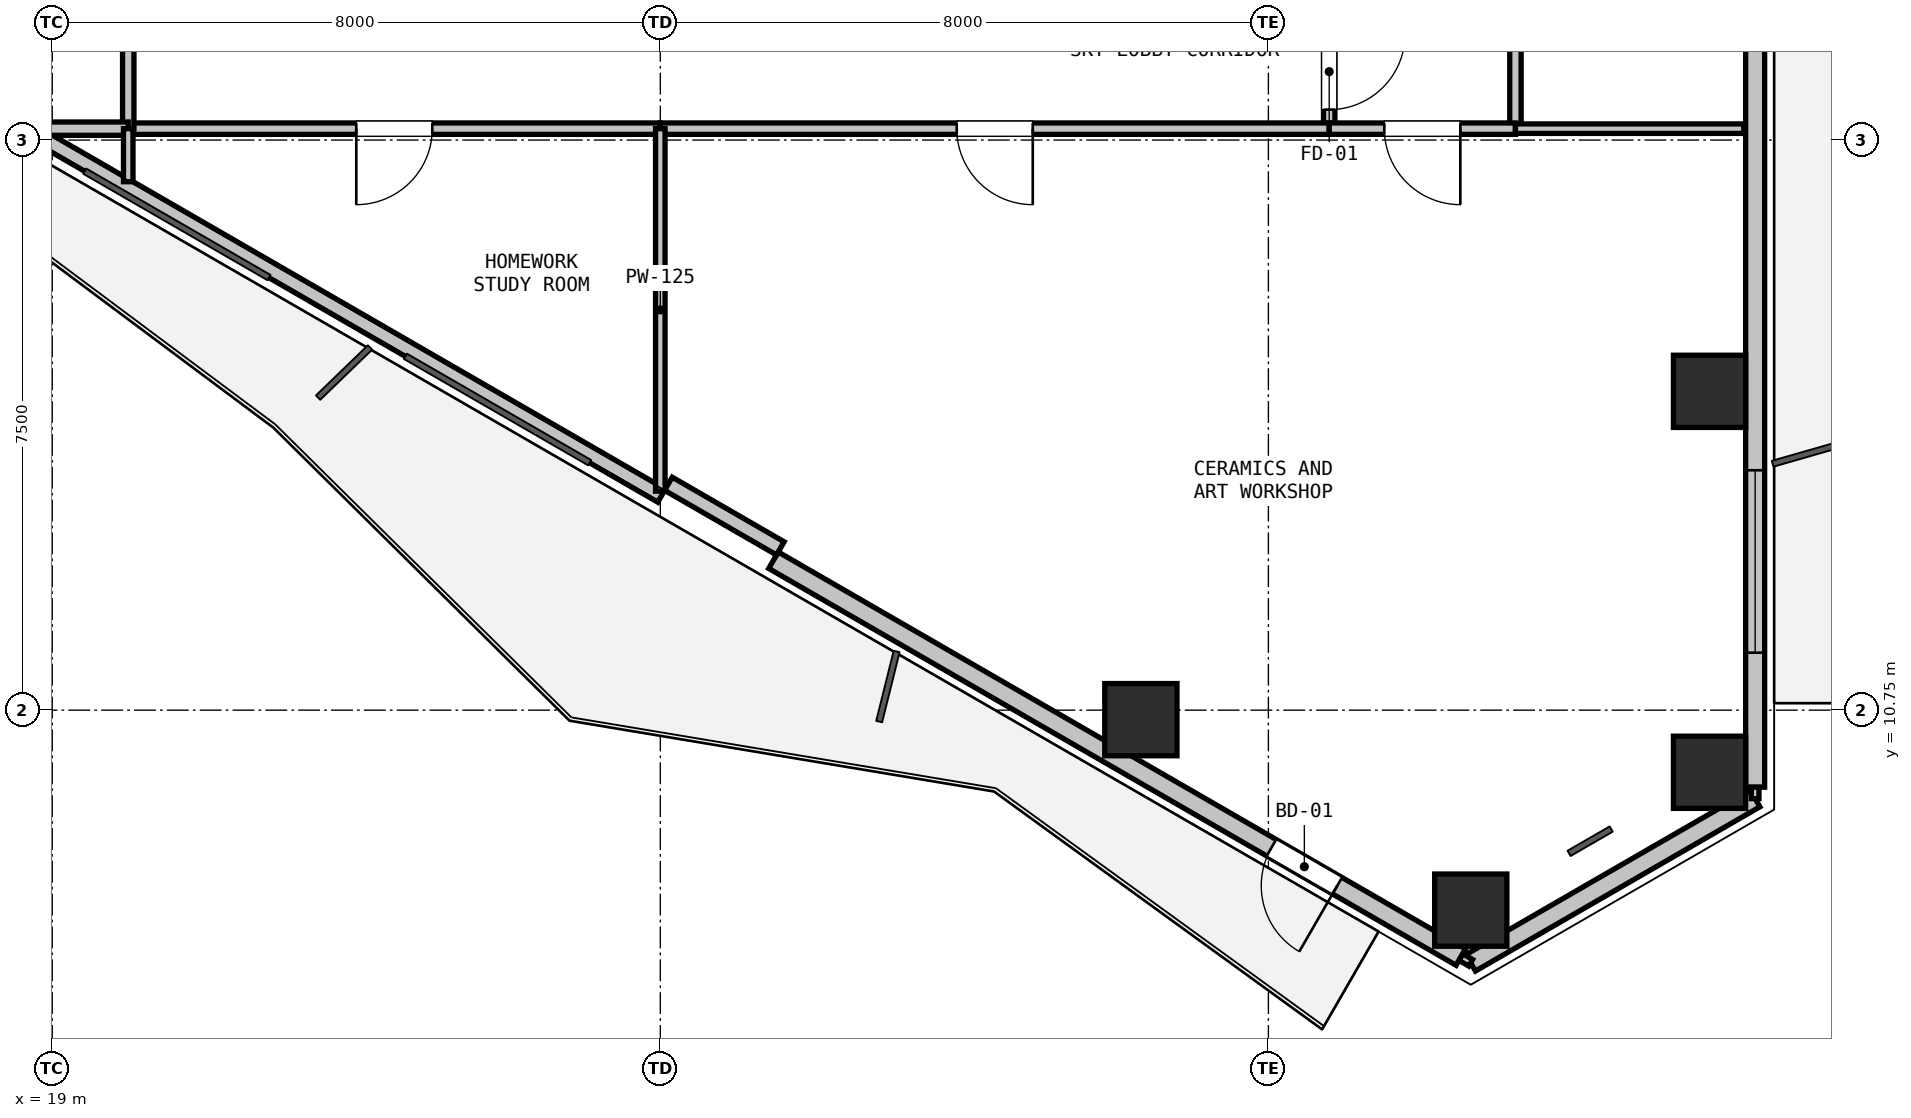
"""IFC4 building model, lengths in metres.
Left out: names, types, materials, properties, quantities, classifications, styles, units other than length and angle.
Written with IfcOpenShell. Run it as: python <this file> out.ifc"""

import sys

from ifc_helpers import new_model, si_unit, direction, frame, frame_2d, origin, origin_2d, place, context, subcontext, project, spatial, rectangle, hollow_rectangle, extrude, element, fill, save


model = new_model("IFC4")
c1 = context("Model", 3, precision=1e-05, world=origin(), true_north=direction((0.0, 1.0)))
c2 = subcontext(c1, "Body", "Model", "MODEL_VIEW")
j1 = project(units=[si_unit("LENGTHUNIT", "METRE"), si_unit("PLANEANGLEUNIT", "RADIAN")], contexts=[c1])
p1 = place(None, origin())
s1 = spatial("IfcSite", under=j1, at=p1, CompositionType="ELEMENT")
p2 = place(p1, origin())
s2 = spatial("IfcBuilding", under=s1, at=p2, CompositionType="ELEMENT")
p3 = place(p2, frame((0.0, 0.0, 170.7)))
s3 = spatial("IfcBuildingStorey", under=s2, at=p3, CompositionType="ELEMENT", Elevation=170.7)
for number, where, z_axis, x_axis in (
    (1, (40.804, 14.944, 0.0), (0.0, 0.0, 1.0), (1.0, 0.0, 0.0)),
    (2, (40.804, 9.933, 0.0), (0.0, 0.0, 1.0), (1.0, 0.0, 0.0)),
    (3, (37.662, 8.119, 0.0), (0.0, 0.0, 1.0), (1.0, 0.0, 0.0)),
    (4, (33.322, 10.625, 0.0), (0.0, 0.0, 1.0), (1.0, 0.0, 0.0)),
):
    element("IfcColumn", number, at=place(p3, frame(where, z_axis=z_axis, x_axis=x_axis)), inside=s3, PredefinedType="COLUMN", context=c2, shape_type="SweptSolid", body=[
        extrude(hollow_rectangle(XDim=0.95, YDim=0.95, WallThickness=0.028, at=origin_2d()), origin(), (0.0, 0.0, 1.0), 3.22),
    ])
p4 = place(p3, frame((41.404, 9.586, 0.0), z_axis=(0.0, 0.0, 1.0), x_axis=(-0.866047252008, -0.499962155857, 0.0)))
e5 = element("IfcWall", 5, at=p4, inside=s3, PredefinedType="SOLIDWALL", context=c2, shape_type="SweptSolid", body=[
    extrude(rectangle(XDim=4.32, YDim=0.25, at=frame_2d((2.16, 0.0))), origin(), (0.0, 0.0, 1.0), 4.19),
])
p5 = place(p3, frame((41.404, 20.179, 0.0), z_axis=(0.0, 0.0, 1.0), x_axis=(0.0, -1.0, 0.0)))
e6 = element("IfcWall", 6, at=p5, inside=s3, PredefinedType="SOLIDWALL", context=c2, shape_type="SweptSolid", body=[
    extrude(rectangle(XDim=10.442, YDim=0.25, at=frame_2d((5.221, 0.0))), origin(), (0.0, 0.0, 1.0), 3.205),
])
p6 = place(p5, frame((6.273, 0.0, 0.9)))
e7 = element("IfcOpeningElement", 7, at=p6, cuts=e6, PredefinedType="OPENING", context=c2, shape_type="SweptSolid", body=[
    extrude(rectangle(XDim=2.4, YDim=2.2, at=frame_2d((1.2, 1.1))), frame((0.0, 0.135, 0.0), z_axis=(0.0, -1.0, 0.0), x_axis=(1.0, 0.0, 0.0)), (0.0, 0.0, 1.0), 0.27),
])
p7 = place(p3, frame((37.532, 7.501, 0.0), z_axis=(0.0, 0.0, 1.0), x_axis=(-0.866027516296, 0.499996341005, 0.0)))
e8 = element("IfcWall", 8, at=p7, inside=s3, PredefinedType="SOLIDWALL", context=c2, shape_type="SweptSolid", body=[
    extrude(rectangle(XDim=10.442, YDim=0.25, at=frame_2d((5.221, 0.0))), origin(), (0.0, 0.0, 1.0), 3.205),
])
p8 = place(p7, frame((1.878, 0.0, 0.0)))
e9 = element("IfcOpeningElement", 9, at=p8, cuts=e8, PredefinedType="OPENING", context=c2, shape_type="SweptSolid", body=[
    extrude(rectangle(XDim=1.0, YDim=2.1, at=frame_2d((0.5, 1.05))), frame((0.0, 0.135, 0.0), z_axis=(0.0, -1.0, 0.0), x_axis=(1.0, 0.0, 0.0)), (0.0, 0.0, 1.0), 0.27),
])
p9 = place(p3, frame((27.017, 13.573, 0.0), z_axis=(0.0, 0.0, 1.0), x_axis=(-0.866026169916, 0.499998673018, 0.0)))
e10 = element("IfcWall", 10, at=p9, inside=s3, PredefinedType="PARAPET", context=c2, shape_type="SweptSolid", body=[
    extrude(rectangle(XDim=9.742, YDim=0.2, at=frame_2d((4.871, 0.0))), origin(), (0.0, 0.0, 1.0), 0.2),
])
p10 = place(p3, frame((28.579, 12.878, 0.0), z_axis=(0.0, 0.0, 1.0), x_axis=(-0.866087547558, 0.499892348375, 0.0)))
e11 = element("IfcWall", 11, at=p10, inside=s3, PredefinedType="PARAPET", context=c2, shape_type="SweptSolid", body=[
    extrude(rectangle(XDim=1.7, YDim=0.2, at=frame_2d((0.85, 0.0))), origin(), (0.0, 0.0, 1.0), 4.19),
])
p11 = place(p3, frame((35.8, 19.9, 0.0), z_axis=(0.0, 0.0, 1.0), x_axis=(0.0, -1.0, 0.0)))
e12 = element("IfcWall", 12, at=p11, inside=s3, PredefinedType="PARTITIONING", context=c2, shape_type="SweptSolid", body=[
    extrude(rectangle(XDim=1.5, YDim=0.15, at=frame_2d((0.75, 0.0))), origin(), (0.0, 0.0, 1.0), 3.205),
])
p12 = place(p11, frame((0.25, 0.0, 0.0)))
e13 = element("IfcOpeningElement", 13, at=p12, cuts=e12, PredefinedType="OPENING", context=c2, shape_type="SweptSolid", body=[
    extrude(rectangle(XDim=1.0, YDim=2.15, at=frame_2d((0.5, 1.075))), frame((0.0, 0.085, 0.0), z_axis=(0.0, -1.0, 0.0), x_axis=(1.0, 0.0, 0.0)), (0.0, 0.0, 1.0), 0.17),
])
p13 = place(p3, frame((35.8, 18.4, 0.0), z_axis=(0.0, 0.0, 1.0), x_axis=(-1.0, 0.0, 0.0)))
e14 = element("IfcWall", 14, at=p13, inside=s3, PredefinedType="PARTITIONING", context=c2, shape_type="SweptSolid", body=[
    extrude(rectangle(XDim=8.8, YDim=0.15, at=frame_2d((4.4, 0.0))), origin(), (0.0, 0.0, 1.0), 3.205),
])
p14 = place(p13, frame((3.9, 0.0, 0.0)))
e15 = element("IfcOpeningElement", 15, at=p14, cuts=e14, PredefinedType="OPENING", context=c2, shape_type="SweptSolid", body=[
    extrude(rectangle(XDim=1.0, YDim=2.15, at=frame_2d((0.5, 1.075))), frame((0.0, 0.085, 0.0), z_axis=(0.0, -1.0, 0.0), x_axis=(1.0, 0.0, 0.0)), (0.0, 0.0, 1.0), 0.17),
])
p15 = place(p3, frame((27.0, 18.4, 0.0), z_axis=(0.0, 0.0, 1.0), x_axis=(-1.0, 0.0, 0.0)))
e16 = element("IfcWall", 16, at=p15, inside=s3, PredefinedType="PARTITIONING", context=c2, shape_type="SweptSolid", body=[
    extrude(rectangle(XDim=7.0, YDim=0.15, at=frame_2d((3.5, 0.0))), origin(), (0.0, 0.0, 1.0), 2.365),
])
p16 = place(p15, frame((3.0, 0.0, 0.0)))
e17 = element("IfcOpeningElement", 17, at=p16, cuts=e16, PredefinedType="OPENING", context=c2, shape_type="SweptSolid", body=[
    extrude(rectangle(XDim=1.0, YDim=2.15, at=frame_2d((0.5, 1.075))), frame((0.0, 0.085, 0.0), z_axis=(0.0, -1.0, 0.0), x_axis=(1.0, 0.0, 0.0)), (0.0, 0.0, 1.0), 0.17),
])
p17 = place(p3, frame((20.0, 18.4, 0.0), z_axis=(0.0, 0.0, 1.0), x_axis=(0.0, 1.0, 0.0)))
e18 = element("IfcWall", 18, at=p17, inside=s3, PredefinedType="PARTITIONING", context=c2, shape_type="SweptSolid", body=[
    extrude(rectangle(XDim=5.8, YDim=0.15, at=frame_2d((2.9, 0.0))), origin(), (0.0, 0.0, 1.0), 2.365),
])
p18 = place(p17, frame((2.475, 0.0, 0.0)))
e19 = element("IfcOpeningElement", 19, at=p18, cuts=e18, PredefinedType="OPENING", context=c2, shape_type="SweptSolid", body=[
    extrude(rectangle(XDim=0.85, YDim=2.1, at=frame_2d((0.425, 1.05))), frame((0.0, 0.085, 0.0), z_axis=(0.0, -1.0, 0.0), x_axis=(1.0, 0.0, 0.0)), (0.0, 0.0, 1.0), 0.17),
])
p19 = place(p3, frame((38.25, 26.75, 0.0), z_axis=(0.0, 0.0, 1.0), x_axis=(0.0, -1.0, 0.0)))
e20 = element("IfcWall", 20, at=p19, inside=s3, PredefinedType="PARTITIONING", context=c2, shape_type="SweptSolid", body=[
    extrude(rectangle(XDim=8.35, YDim=0.15, at=frame_2d((4.175, 0.0))), origin(), (0.0, 0.0, 1.0), 4.57),
])
p20 = place(p19, frame((3.675, 0.0, 0.0)))
e21 = element("IfcOpeningElement", 21, at=p20, cuts=e20, PredefinedType="OPENING", context=c2, shape_type="SweptSolid", body=[
    extrude(rectangle(XDim=1.0, YDim=2.15, at=frame_2d((0.5, 1.075))), frame((0.0, 0.085, 0.0), z_axis=(0.0, -1.0, 0.0), x_axis=(1.0, 0.0, 0.0)), (0.0, 0.0, 1.0), 0.17),
])
p21 = place(p3, frame((38.25, 18.4, 0.0), z_axis=(0.0, 0.0, 1.0), x_axis=(-1.0, 0.0, 0.0)))
e22 = element("IfcWall", 22, at=p21, inside=s3, PredefinedType="PARTITIONING", context=c2, shape_type="SweptSolid", body=[
    extrude(rectangle(XDim=2.45, YDim=0.15, at=frame_2d((1.225, 0.0))), origin(), (0.0, 0.0, 1.0), 3.205),
])
p22 = place(p21, frame((0.725, 0.0, 0.0)))
e23 = element("IfcOpeningElement", 23, at=p22, cuts=e22, PredefinedType="OPENING", context=c2, shape_type="SweptSolid", body=[
    extrude(rectangle(XDim=1.0, YDim=2.15, at=frame_2d((0.5, 1.075))), frame((0.0, 0.085, 0.0), z_axis=(0.0, -1.0, 0.0), x_axis=(1.0, 0.0, 0.0)), (0.0, 0.0, 1.0), 0.17),
])
p23 = place(p3, frame((20.0, 18.4, 0.0), z_axis=(0.0, 0.0, 1.0), x_axis=(-1.0, 0.0, 0.0)))
e24 = element("IfcWall", 24, at=p23, inside=s3, PredefinedType="PLUMBINGWALL", context=c2, shape_type="SweptSolid", body=[
    extrude(rectangle(XDim=1.269, YDim=0.175, at=frame_2d((0.634, 0.0))), origin(), (0.0, 0.0, 1.0), 2.365),
])
p24 = place(p3, frame((41.255, 18.4, 0.0), z_axis=(0.0, 0.0, 1.0), x_axis=(-1.0, 0.0, 0.0)))
e25 = element("IfcWall", 25, at=p24, inside=s3, PredefinedType="PARTITIONING", context=c2, shape_type="SweptSolid", body=[
    extrude(rectangle(XDim=3.005, YDim=0.125, at=frame_2d((1.502, 0.0))), origin(), (0.0, 0.0, 1.0), 2.365),
])
p25 = place(p3, frame((37.662, 7.426, 0.0), z_axis=(0.0, 0.0, 1.0), x_axis=(-0.866131372301, 0.499816412211, 0.0)))
e26 = element("IfcWall", 26, at=p25, inside=s3, PredefinedType="PARTITIONING", context=c2, shape_type="SweptSolid", body=[
    extrude(rectangle(XDim=0.15, YDim=0.1, at=frame_2d((0.075, 0.0))), origin(), (0.0, 0.0, 1.0), 4.57),
])
p26 = place(p3, frame((27.0, 13.631, 0.0), z_axis=(0.0, 0.0, 1.0), x_axis=(0.0, 1.0, 0.0)))
e27 = element("IfcWall", 27, at=p26, inside=s3, PredefinedType="PARTITIONING", context=c2, shape_type="SweptSolid", body=[
    extrude(rectangle(XDim=4.769, YDim=0.125, at=frame_2d((2.385, 0.0))), origin(), (0.0, 0.0, 1.0), 2.365),
])
p27 = place(p3, frame((41.404, 9.736, 0.0), z_axis=(0.0, 0.0, 1.0), x_axis=(0.0, -1.0, 0.0)))
e28 = element("IfcWall", 28, at=p27, inside=s3, PredefinedType="PARTITIONING", context=c2, shape_type="SweptSolid", body=[
    extrude(rectangle(XDim=0.15, YDim=0.1, at=frame_2d((0.075, 0.0))), origin(), (0.0, 0.0, 1.0), 4.57),
])
p28 = place(p3, frame((20.0, 17.702, 0.0), z_axis=(0.0, 0.0, 1.0), x_axis=(0.0, 1.0, 0.0)))
e29 = element("IfcWall", 29, at=p28, inside=s3, PredefinedType="PARTITIONING", context=c2, shape_type="SweptSolid", body=[
    extrude(rectangle(XDim=0.698, YDim=0.125, at=frame_2d((0.349, 0.0))), origin(), (0.0, 0.0, 1.0), 2.365),
])
p29 = place(p6, origin())
e30 = element("IfcWindow", 30, at=p29, inside=s3, PartitioningType="SINGLE_PANEL", PredefinedType="WINDOW", context=c2, shape_type="SweptSolid", body=[
    extrude(rectangle(XDim=2.4, YDim=2.2, at=frame_2d((1.2, 1.1))), frame((0.0, 0.03, 0.0), z_axis=(0.0, -1.0, 0.0), x_axis=(1.0, 0.0, 0.0)), (0.0, 0.0, 1.0), 0.06),
])
fill(e7, e30)
p30 = place(p8, origin())
e31 = element("IfcDoor", 31, at=p30, inside=s3, OperationType="SINGLE_SWING_LEFT", PredefinedType="DOOR", context=c2, shape_type="SweptSolid", body=[
    extrude(rectangle(XDim=1.0, YDim=2.1, at=frame_2d((0.5, 1.05))), frame((0.0, 0.025, 0.0), z_axis=(0.0, -1.0, 0.0), x_axis=(1.0, 0.0, 0.0)), (0.0, 0.0, 1.0), 0.05),
])
fill(e9, e31)
p31 = place(p12, origin())
e32 = element("IfcDoor", 32, at=p31, inside=s3, OperationType="SINGLE_SWING_LEFT", PredefinedType="DOOR", context=c2, shape_type="SweptSolid", body=[
    extrude(rectangle(XDim=1.0, YDim=2.15, at=frame_2d((0.5, 1.075))), frame((0.0, 0.025, 0.0), z_axis=(0.0, -1.0, 0.0), x_axis=(1.0, 0.0, 0.0)), (0.0, 0.0, 1.0), 0.05),
])
fill(e13, e32)
p32 = place(p14, origin())
e33 = element("IfcDoor", 33, at=p32, inside=s3, OperationType="SINGLE_SWING_LEFT", PredefinedType="DOOR", context=c2, shape_type="SweptSolid", body=[
    extrude(rectangle(XDim=1.0, YDim=2.15, at=frame_2d((0.5, 1.075))), frame((0.0, 0.025, 0.0), z_axis=(0.0, -1.0, 0.0), x_axis=(1.0, 0.0, 0.0)), (0.0, 0.0, 1.0), 0.05),
])
fill(e15, e33)
p33 = place(p16, origin())
e34 = element("IfcDoor", 34, at=p33, inside=s3, OperationType="SINGLE_SWING_RIGHT", PredefinedType="DOOR", context=c2, shape_type="SweptSolid", body=[
    extrude(rectangle(XDim=1.0, YDim=2.15, at=frame_2d((0.5, 1.075))), frame((0.0, 0.025, 0.0), z_axis=(0.0, -1.0, 0.0), x_axis=(1.0, 0.0, 0.0)), (0.0, 0.0, 1.0), 0.05),
])
fill(e17, e34)
p34 = place(p22, origin())
e35 = element("IfcDoor", 35, at=p34, inside=s3, OperationType="SINGLE_SWING_LEFT", PredefinedType="DOOR", context=c2, shape_type="SweptSolid", body=[
    extrude(rectangle(XDim=1.0, YDim=2.15, at=frame_2d((0.5, 1.075))), frame((0.0, 0.025, 0.0), z_axis=(0.0, -1.0, 0.0), x_axis=(1.0, 0.0, 0.0)), (0.0, 0.0, 1.0), 0.05),
])
fill(e23, e35)
save(model, sys.argv[1])
